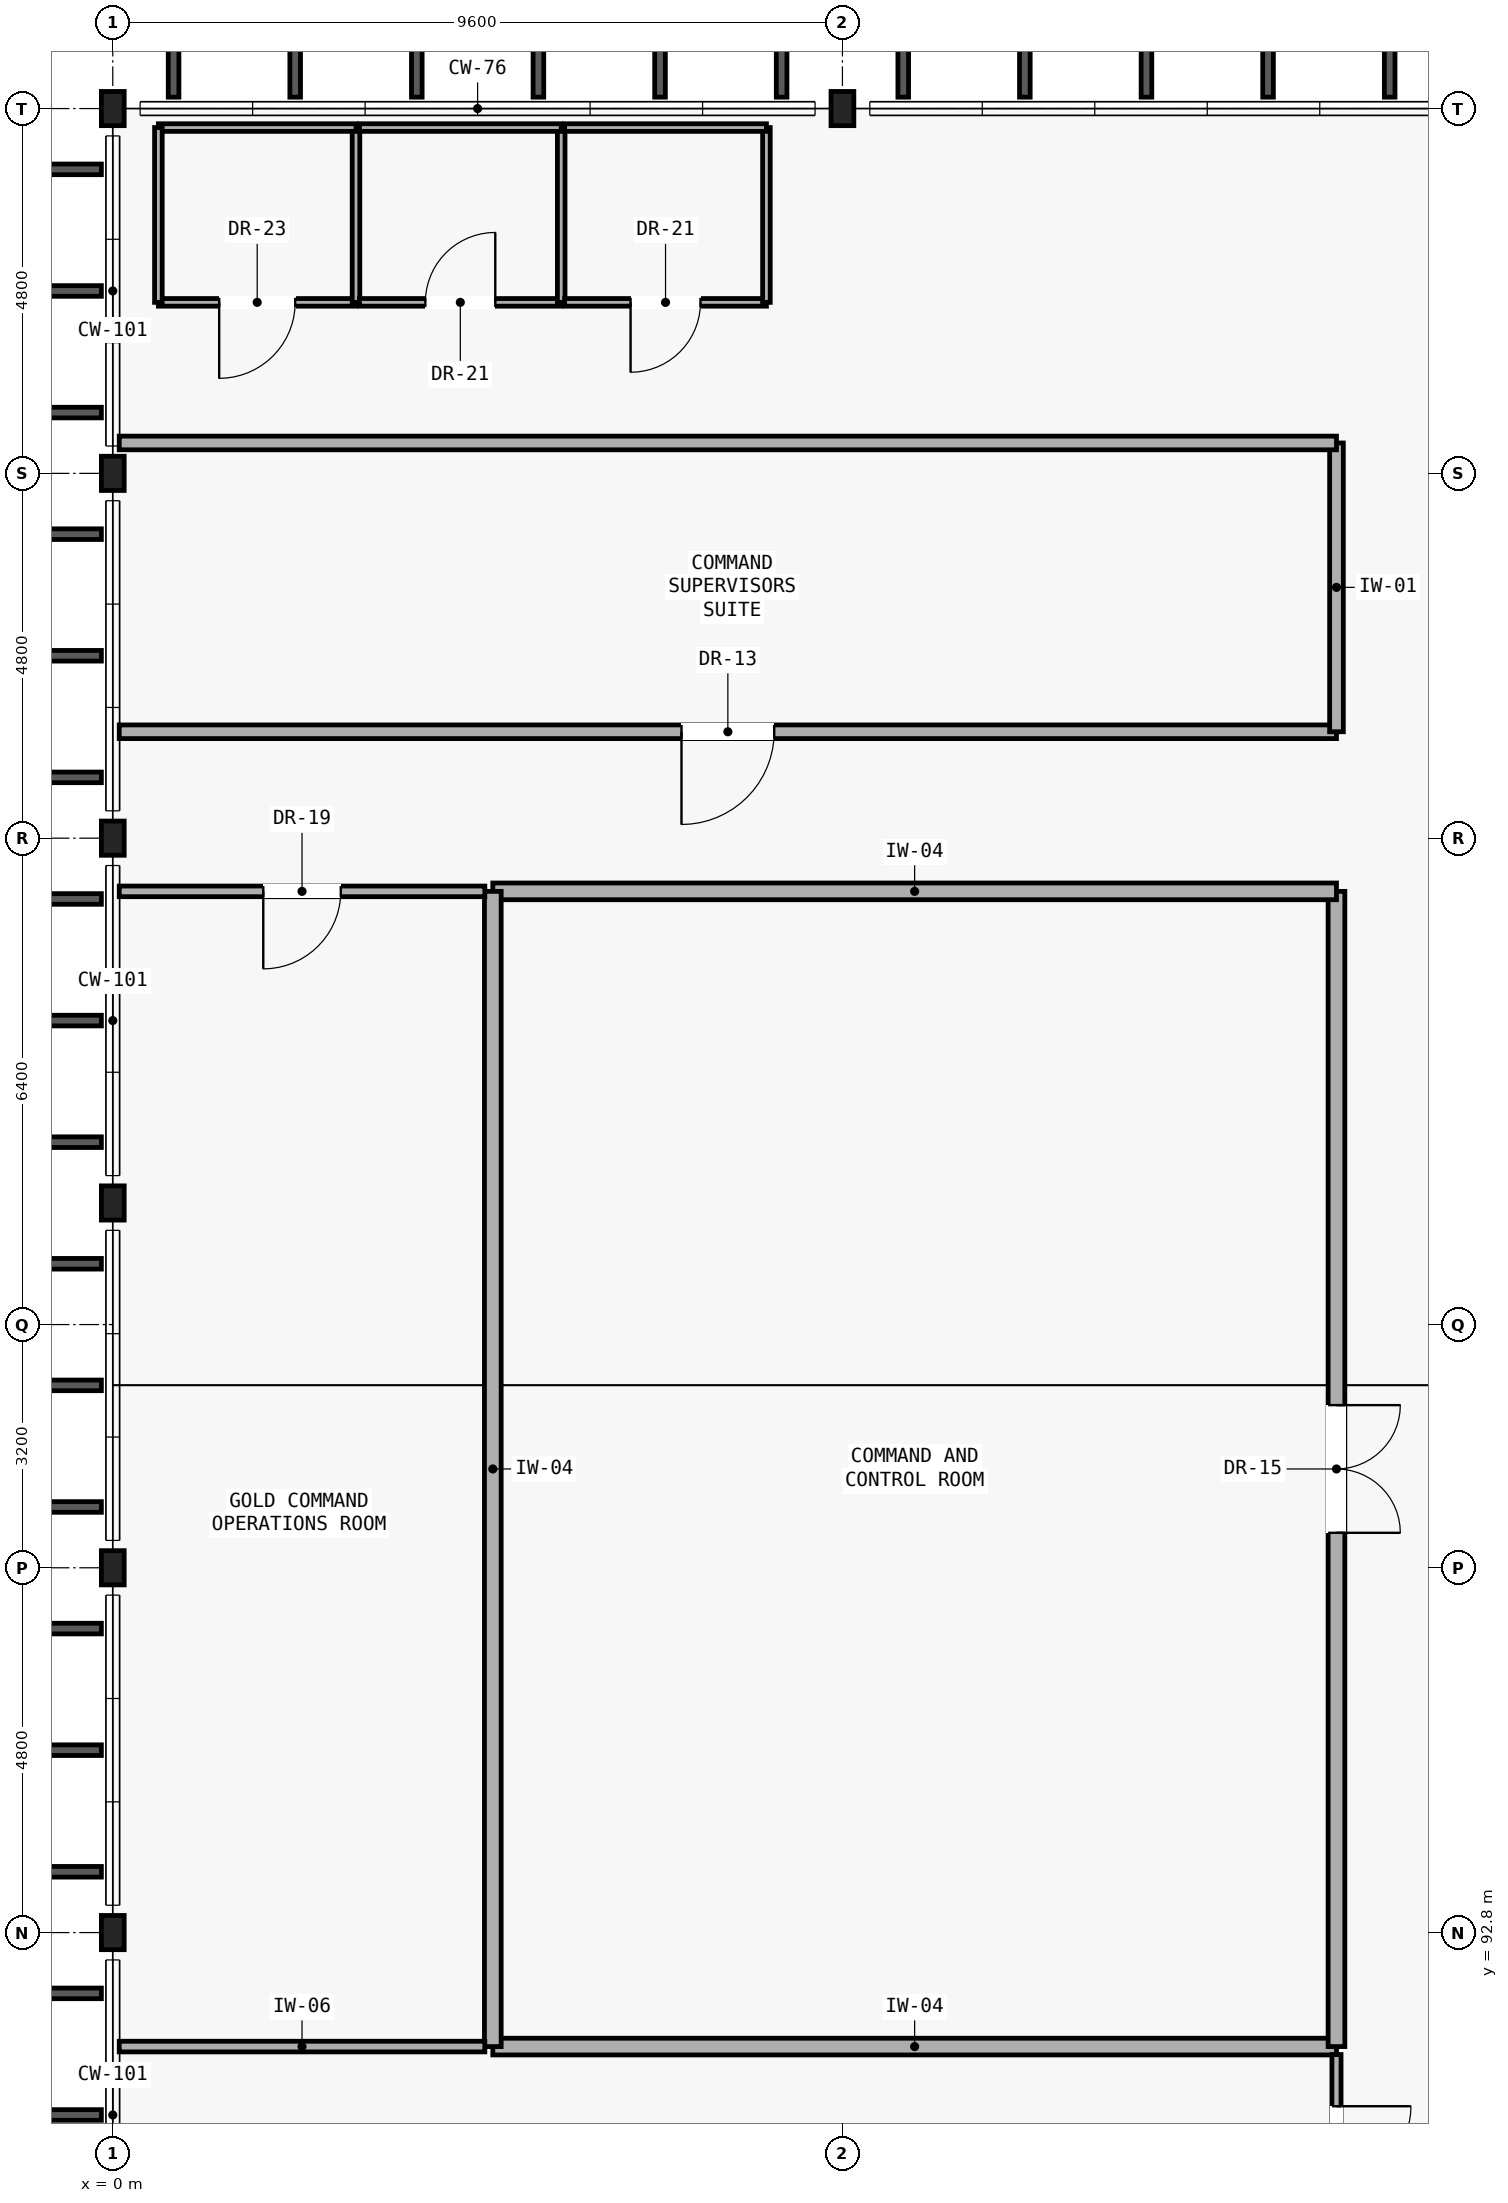
"""IFC4 building model, lengths in metres.
Left out: names, types, materials, properties, quantities, classifications, styles, units other than length and angle.
Written with IfcOpenShell. Run it as: python <this file> out.ifc"""

import sys

from ifc_helpers import new_model, si_unit, direction, frame, frame_2d, origin, origin_2d, place, context, subcontext, project, spatial, rectangle, i_section, extrude, element, fill, save


model = new_model("IFC4")
c1 = context("Model", 3, precision=1e-05, world=origin(), true_north=direction((0.0, 1.0)))
c2 = subcontext(c1, "Body", "Model", "MODEL_VIEW")
j1 = project(units=[si_unit("LENGTHUNIT", "METRE"), si_unit("PLANEANGLEUNIT", "RADIAN")], contexts=[c1])
p1 = place(None, origin())
s1 = spatial("IfcSite", under=j1, at=p1, CompositionType="ELEMENT")
p2 = place(p1, origin())
s2 = spatial("IfcBuilding", under=s1, at=p2, CompositionType="ELEMENT")
p3 = place(p2, frame((0.0, 0.0, 26.25)))
s3 = spatial("IfcBuildingStorey", under=s2, at=p3, CompositionType="ELEMENT", Elevation=26.25)
for number, where, z_axis, x_axis in (
    (1, (0.0, 92.8, 0.0), (0.0, 0.0, 1.0), (1.0, 0.0, 0.0)),
    (2, (0.0, 97.6, 0.0), (0.0, 0.0, 1.0), (1.0, 0.0, 0.0)),
    (3, (0.0, 102.4, 0.0), (0.0, 0.0, 1.0), (1.0, 0.0, 0.0)),
    (4, (0.0, 107.2, 0.0), (0.0, 0.0, 1.0), (1.0, 0.0, 0.0)),
    (5, (0.0, 112.0, 0.0), (0.0, 0.0, 1.0), (1.0, 0.0, 0.0)),
    (6, (0.0, 116.8, 0.0), (0.0, 0.0, 1.0), (1.0, 0.0, 0.0)),
    (7, (9.6, 116.8, 0.0), (0.0, 0.0, 1.0), (1.0, 0.0, 0.0)),
):
    element("IfcColumn", number, at=place(p3, frame(where, z_axis=z_axis, x_axis=x_axis)), inside=s3, PredefinedType="COLUMN", context=c2, shape_type="SweptSolid", body=[
        extrude(i_section(OverallWidth=0.3, OverallDepth=0.45, WebThickness=0.014, FlangeThickness=0.026, FilletRadius=0.027, at=origin_2d()), origin(), (0.0, 0.0, 1.0), 4.9),
    ])
p4 = place(p3, frame((5.0, 91.3, 0.0), z_axis=(0.0, 0.0, 1.0), x_axis=(1.0, 0.0, 0.0)))
e8 = element("IfcWall", 8, at=p4, inside=s3, PredefinedType="PARTITIONING", context=c2, shape_type="SweptSolid", body=[
    extrude(rectangle(XDim=11.1, YDim=0.22, at=frame_2d((5.55, 0.0))), origin(), (0.0, 0.0, 1.0), 4.71),
])
p5 = place(p3, frame((16.1, 91.3, 0.0), z_axis=(0.0, 0.0, 1.0), x_axis=(0.0, 1.0, 0.0)))
e9 = element("IfcWall", 9, at=p5, inside=s3, PredefinedType="PARTITIONING", context=c2, shape_type="SweptSolid", body=[
    extrude(rectangle(XDim=15.2, YDim=0.22, at=frame_2d((7.6, 0.0))), origin(), (0.0, 0.0, 1.0), 4.71),
])
p6 = place(p5, frame((6.76, 0.0, 0.0)))
e10 = element("IfcOpeningElement", 10, at=p6, cuts=e9, PredefinedType="OPENING", context=c2, shape_type="SweptSolid", body=[
    extrude(rectangle(XDim=1.68, YDim=2.2, at=frame_2d((0.84, 1.1))), frame((0.0, 0.12, 0.0), z_axis=(0.0, -1.0, 0.0), x_axis=(1.0, 0.0, 0.0)), (0.0, 0.0, 1.0), 0.24),
])
p7 = place(p3, frame((16.1, 106.5, 0.0), z_axis=(0.0, 0.0, 1.0), x_axis=(-1.0, 0.0, 0.0)))
e11 = element("IfcWall", 11, at=p7, inside=s3, PredefinedType="PARTITIONING", context=c2, shape_type="SweptSolid", body=[
    extrude(rectangle(XDim=11.1, YDim=0.22, at=frame_2d((5.55, 0.0))), origin(), (0.0, 0.0, 1.0), 4.71),
])
p8 = place(p3, frame((5.0, 106.5, 0.0), z_axis=(0.0, 0.0, 1.0), x_axis=(0.0, -1.0, 0.0)))
e12 = element("IfcWall", 12, at=p8, inside=s3, PredefinedType="PARTITIONING", context=c2, shape_type="SweptSolid", body=[
    extrude(rectangle(XDim=15.2, YDim=0.22, at=frame_2d((7.6, 0.0))), origin(), (0.0, 0.0, 1.0), 4.71),
])
p9 = place(p3, frame((0.085, 91.3, 0.0), z_axis=(0.0, 0.0, 1.0), x_axis=(1.0, 0.0, 0.0)))
e13 = element("IfcWall", 13, at=p9, inside=s3, PredefinedType="PARTITIONING", context=c2, shape_type="SweptSolid", body=[
    extrude(rectangle(XDim=4.81, YDim=0.14, at=frame_2d((2.405, 0.0))), origin(), (0.0, 0.0, 1.0), 4.71),
])
p10 = place(p3, frame((4.895, 106.5, 0.0), z_axis=(0.0, 0.0, 1.0), x_axis=(-1.0, 0.0, 0.0)))
e14 = element("IfcWall", 14, at=p10, inside=s3, PredefinedType="PARTITIONING", context=c2, shape_type="SweptSolid", body=[
    extrude(rectangle(XDim=4.81, YDim=0.14, at=frame_2d((2.405, 0.0))), origin(), (0.0, 0.0, 1.0), 4.71),
])
p11 = place(p10, frame((1.895, 0.0, 0.0)))
e15 = element("IfcOpeningElement", 15, at=p11, cuts=e14, PredefinedType="OPENING", context=c2, shape_type="SweptSolid", body=[
    extrude(rectangle(XDim=1.02, YDim=2.1, at=frame_2d((0.51, 1.05))), frame((0.0, 0.08, 0.0), z_axis=(0.0, -1.0, 0.0), x_axis=(1.0, 0.0, 0.0)), (0.0, 0.0, 1.0), 0.16),
])
p12 = place(p3, frame((0.085, 108.6, 0.0), z_axis=(0.0, 0.0, 1.0), x_axis=(1.0, 0.0, 0.0)))
e16 = element("IfcWall", 16, at=p12, inside=s3, PredefinedType="PARTITIONING", context=c2, shape_type="SweptSolid", body=[
    extrude(rectangle(XDim=16.015, YDim=0.18, at=frame_2d((8.008, 0.0))), origin(), (0.0, 0.0, 1.0), 4.71),
])
p13 = place(p12, frame((7.397, 0.0, 0.0)))
e17 = element("IfcOpeningElement", 17, at=p13, cuts=e16, PredefinedType="OPENING", context=c2, shape_type="SweptSolid", body=[
    extrude(rectangle(XDim=1.22, YDim=2.1, at=frame_2d((0.61, 1.05))), frame((0.0, 0.1, 0.0), z_axis=(0.0, -1.0, 0.0), x_axis=(1.0, 0.0, 0.0)), (0.0, 0.0, 1.0), 0.2),
])
p14 = place(p3, frame((16.1, 108.6, 0.0), z_axis=(0.0, 0.0, 1.0), x_axis=(0.0, 1.0, 0.0)))
e18 = element("IfcWall", 18, at=p14, inside=s3, PredefinedType="PARTITIONING", context=c2, shape_type="SweptSolid", body=[
    extrude(rectangle(XDim=3.8, YDim=0.18, at=frame_2d((1.9, 0.0))), origin(), (0.0, 0.0, 1.0), 4.71),
])
p15 = place(p3, frame((16.1, 112.4, 0.0), z_axis=(0.0, 0.0, 1.0), x_axis=(-1.0, 0.0, 0.0)))
e19 = element("IfcWall", 19, at=p15, inside=s3, PredefinedType="PARTITIONING", context=c2, shape_type="SweptSolid", body=[
    extrude(rectangle(XDim=16.015, YDim=0.18, at=frame_2d((8.008, 0.0))), origin(), (0.0, 0.0, 1.0), 4.71),
])
p16 = place(p3, frame((0.6, 114.25, 0.0), z_axis=(0.0, 0.0, 1.0), x_axis=(1.0, 0.0, 0.0)))
e20 = element("IfcWall", 20, at=p16, inside=s3, PredefinedType="PARTITIONING", context=c2, shape_type="SweptSolid", body=[
    extrude(rectangle(XDim=2.6, YDim=0.1, at=frame_2d((1.3, 0.0))), origin(), (0.0, 0.0, 1.0), 4.19),
])
p17 = place(p16, frame((0.8, 0.0, 0.0)))
e21 = element("IfcOpeningElement", 21, at=p17, cuts=e20, PredefinedType="OPENING", context=c2, shape_type="SweptSolid", body=[
    extrude(rectangle(XDim=1.0, YDim=2.08, at=frame_2d((0.5, 1.04))), frame((0.0, 0.06, 0.0), z_axis=(0.0, -1.0, 0.0), x_axis=(1.0, 0.0, 0.0)), (0.0, 0.0, 1.0), 0.12),
])
p18 = place(p3, frame((3.2, 114.25, 0.0), z_axis=(0.0, 0.0, 1.0), x_axis=(0.0, 1.0, 0.0)))
e22 = element("IfcWall", 22, at=p18, inside=s3, PredefinedType="PARTITIONING", context=c2, shape_type="SweptSolid", body=[
    extrude(rectangle(XDim=2.3, YDim=0.1, at=frame_2d((1.15, 0.0))), origin(), (0.0, 0.0, 1.0), 4.71),
])
p19 = place(p3, frame((3.2, 116.55, 0.0), z_axis=(0.0, 0.0, 1.0), x_axis=(-1.0, 0.0, 0.0)))
e23 = element("IfcWall", 23, at=p19, inside=s3, PredefinedType="PARTITIONING", context=c2, shape_type="SweptSolid", body=[
    extrude(rectangle(XDim=2.6, YDim=0.1, at=frame_2d((1.3, 0.0))), origin(), (0.0, 0.0, 1.0), 3.89),
])
p20 = place(p3, frame((0.6, 116.55, 0.0), z_axis=(0.0, 0.0, 1.0), x_axis=(0.0, -1.0, 0.0)))
e24 = element("IfcWall", 24, at=p20, inside=s3, PredefinedType="PARTITIONING", context=c2, shape_type="SweptSolid", body=[
    extrude(rectangle(XDim=2.3, YDim=0.1, at=frame_2d((1.15, 0.0))), origin(), (0.0, 0.0, 1.0), 4.71),
])
p21 = place(p3, frame((3.245, 114.25, 0.0), z_axis=(0.0, 0.0, 1.0), x_axis=(1.0, 0.0, 0.0)))
e25 = element("IfcWall", 25, at=p21, inside=s3, PredefinedType="PARTITIONING", context=c2, shape_type="SweptSolid", body=[
    extrude(rectangle(XDim=2.655, YDim=0.1, at=frame_2d((1.327, 0.0))), origin(), (0.0, 0.0, 1.0), 4.19),
])
p22 = place(p21, frame((0.867, 0.0, 0.0)))
e26 = element("IfcOpeningElement", 26, at=p22, cuts=e25, PredefinedType="OPENING", context=c2, shape_type="SweptSolid", body=[
    extrude(rectangle(XDim=0.92, YDim=2.08, at=frame_2d((0.46, 1.04))), frame((0.0, 0.06, 0.0), z_axis=(0.0, -1.0, 0.0), x_axis=(1.0, 0.0, 0.0)), (0.0, 0.0, 1.0), 0.12),
])
p23 = place(p3, frame((5.9, 114.25, 0.0), z_axis=(0.0, 0.0, 1.0), x_axis=(0.0, 1.0, 0.0)))
e27 = element("IfcWall", 27, at=p23, inside=s3, PredefinedType="PARTITIONING", context=c2, shape_type="SweptSolid", body=[
    extrude(rectangle(XDim=2.3, YDim=0.1, at=frame_2d((1.15, 0.0))), origin(), (0.0, 0.0, 1.0), 4.71),
])
p24 = place(p3, frame((5.9, 116.55, 0.0), z_axis=(0.0, 0.0, 1.0), x_axis=(-1.0, 0.0, 0.0)))
e28 = element("IfcWall", 28, at=p24, inside=s3, PredefinedType="PARTITIONING", context=c2, shape_type="SweptSolid", body=[
    extrude(rectangle(XDim=2.655, YDim=0.1, at=frame_2d((1.327, 0.0))), origin(), (0.0, 0.0, 1.0), 3.89),
])
p25 = place(p3, frame((5.945, 114.25, 0.0), z_axis=(0.0, 0.0, 1.0), x_axis=(1.0, 0.0, 0.0)))
e29 = element("IfcWall", 29, at=p25, inside=s3, PredefinedType="PARTITIONING", context=c2, shape_type="SweptSolid", body=[
    extrude(rectangle(XDim=2.655, YDim=0.1, at=frame_2d((1.328, 0.0))), origin(), (0.0, 0.0, 1.0), 4.19),
])
p26 = place(p25, frame((0.867, 0.0, 0.0)))
e30 = element("IfcOpeningElement", 30, at=p26, cuts=e29, PredefinedType="OPENING", context=c2, shape_type="SweptSolid", body=[
    extrude(rectangle(XDim=0.92, YDim=2.08, at=frame_2d((0.46, 1.04))), frame((0.0, 0.06, 0.0), z_axis=(0.0, -1.0, 0.0), x_axis=(1.0, 0.0, 0.0)), (0.0, 0.0, 1.0), 0.12),
])
p27 = place(p3, frame((8.6, 114.25, 0.0), z_axis=(0.0, 0.0, 1.0), x_axis=(0.0, 1.0, 0.0)))
e31 = element("IfcWall", 31, at=p27, inside=s3, PredefinedType="PARTITIONING", context=c2, shape_type="SweptSolid", body=[
    extrude(rectangle(XDim=2.3, YDim=0.1, at=frame_2d((1.15, 0.0))), origin(), (0.0, 0.0, 1.0), 4.71),
])
p28 = place(p3, frame((8.6, 116.55, 0.0), z_axis=(0.0, 0.0, 1.0), x_axis=(-1.0, 0.0, 0.0)))
e32 = element("IfcWall", 32, at=p28, inside=s3, PredefinedType="PARTITIONING", context=c2, shape_type="SweptSolid", body=[
    extrude(rectangle(XDim=2.655, YDim=0.1, at=frame_2d((1.328, 0.0))), origin(), (0.0, 0.0, 1.0), 3.89),
])
p29 = place(p3, frame((16.1, 88.855, 0.0), z_axis=(0.0, 0.0, 1.0), x_axis=(0.0, 1.0, 0.0)))
e33 = element("IfcWall", 33, at=p29, inside=s3, PredefinedType="PARTITIONING", context=c2, shape_type="SweptSolid", body=[
    extrude(rectangle(XDim=2.34, YDim=0.12, at=frame_2d((1.17, 0.0))), origin(), (0.0, 0.0, 1.0), 4.71),
])
p30 = place(p29, frame((0.68, 0.0, 0.0)))
e34 = element("IfcOpeningElement", 34, at=p30, cuts=e33, PredefinedType="OPENING", context=c2, shape_type="SweptSolid", body=[
    extrude(rectangle(XDim=0.98, YDim=2.1, at=frame_2d((0.49, 1.05))), frame((0.0, 0.07, 0.0), z_axis=(0.0, -1.0, 0.0), x_axis=(1.0, 0.0, 0.0)), (0.0, 0.0, 1.0), 0.14),
])
p31 = place(p6, frame((1.68, 0.0, 0.0), z_axis=(0.0, 0.0, 1.0), x_axis=(-1.0, 0.0, 0.0)))
e35 = element("IfcDoor", 35, at=p31, inside=s3, OperationType="DOUBLE_DOOR_SINGLE_SWING", PredefinedType="DOOR", context=c2, shape_type="SweptSolid", body=[
    extrude(rectangle(XDim=1.68, YDim=2.2, at=frame_2d((0.84, 1.1))), frame((0.0, 0.025, 0.0), z_axis=(0.0, -1.0, 0.0), x_axis=(1.0, 0.0, 0.0)), (0.0, 0.0, 1.0), 0.05),
])
fill(e10, e35)
p32 = place(p11, origin())
e36 = element("IfcDoor", 36, at=p32, inside=s3, OperationType="SINGLE_SWING_RIGHT", PredefinedType="DOOR", context=c2, shape_type="SweptSolid", body=[
    extrude(rectangle(XDim=1.02, YDim=2.1, at=frame_2d((0.51, 1.05))), frame((0.0, 0.025, 0.0), z_axis=(0.0, -1.0, 0.0), x_axis=(1.0, 0.0, 0.0)), (0.0, 0.0, 1.0), 0.05),
])
fill(e15, e36)
p33 = place(p13, frame((1.22, 0.0, 0.0), z_axis=(0.0, 0.0, 1.0), x_axis=(-1.0, 0.0, 0.0)))
e37 = element("IfcDoor", 37, at=p33, inside=s3, OperationType="SINGLE_SWING_LEFT", PredefinedType="DOOR", context=c2, shape_type="SweptSolid", body=[
    extrude(rectangle(XDim=1.22, YDim=2.1, at=frame_2d((0.61, 1.05))), frame((0.0, 0.025, 0.0), z_axis=(0.0, -1.0, 0.0), x_axis=(1.0, 0.0, 0.0)), (0.0, 0.0, 1.0), 0.05),
])
fill(e17, e37)
p34 = place(p17, frame((1.0, 0.0, 0.0), z_axis=(0.0, 0.0, 1.0), x_axis=(-1.0, 0.0, 0.0)))
e38 = element("IfcDoor", 38, at=p34, inside=s3, OperationType="SINGLE_SWING_LEFT", PredefinedType="DOOR", context=c2, shape_type="SweptSolid", body=[
    extrude(rectangle(XDim=1.0, YDim=2.08, at=frame_2d((0.5, 1.04))), frame((0.0, 0.025, 0.0), z_axis=(0.0, -1.0, 0.0), x_axis=(1.0, 0.0, 0.0)), (0.0, 0.0, 1.0), 0.05),
])
fill(e21, e38)
p35 = place(p22, origin())
e39 = element("IfcDoor", 39, at=p35, inside=s3, OperationType="SINGLE_SWING_RIGHT", PredefinedType="DOOR", context=c2, shape_type="SweptSolid", body=[
    extrude(rectangle(XDim=0.92, YDim=2.08, at=frame_2d((0.46, 1.04))), frame((0.0, 0.025, 0.0), z_axis=(0.0, -1.0, 0.0), x_axis=(1.0, 0.0, 0.0)), (0.0, 0.0, 1.0), 0.05),
])
fill(e26, e39)
p36 = place(p26, frame((0.92, 0.0, 0.0), z_axis=(0.0, 0.0, 1.0), x_axis=(-1.0, 0.0, 0.0)))
e40 = element("IfcDoor", 40, at=p36, inside=s3, OperationType="SINGLE_SWING_LEFT", PredefinedType="DOOR", context=c2, shape_type="SweptSolid", body=[
    extrude(rectangle(XDim=0.92, YDim=2.08, at=frame_2d((0.46, 1.04))), frame((0.0, 0.025, 0.0), z_axis=(0.0, -1.0, 0.0), x_axis=(1.0, 0.0, 0.0)), (0.0, 0.0, 1.0), 0.05),
])
fill(e30, e40)
p37 = place(p30, frame((0.98, 0.0, 0.0), z_axis=(0.0, 0.0, 1.0), x_axis=(-1.0, 0.0, 0.0)))
e41 = element("IfcDoor", 41, at=p37, inside=s3, OperationType="SINGLE_SWING_RIGHT", PredefinedType="DOOR", context=c2, shape_type="SweptSolid", body=[
    extrude(rectangle(XDim=0.98, YDim=2.1, at=frame_2d((0.49, 1.05))), frame((0.0, 0.025, 0.0), z_axis=(0.0, -1.0, 0.0), x_axis=(1.0, 0.0, 0.0)), (0.0, 0.0, 1.0), 0.05),
])
fill(e34, e41)
save(model, sys.argv[1])
